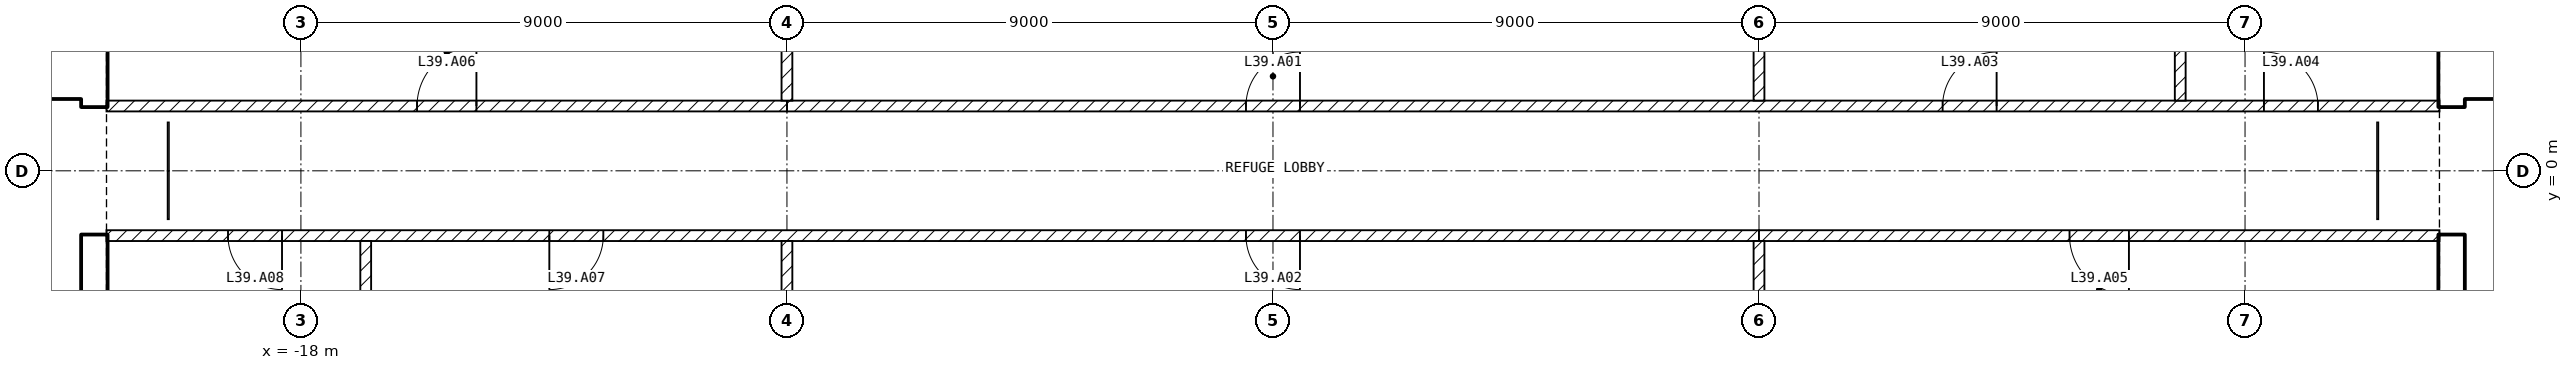
"""IFC4 building model, lengths in metres.
Left out: names, types, materials, properties, quantities, classifications, styles, units other than length and angle.
Written with IfcOpenShell. Run it as: python <this file> out.ifc"""

import sys

from ifc_helpers import new_model, si_unit, direction, frame, frame_2d, origin, place, context, subcontext, project, spatial, rectangle, extrude, element, fill, save


model = new_model("IFC4")
c1 = context("Model", 3, precision=1e-05, world=origin(), true_north=direction((0.0, 1.0)))
c2 = subcontext(c1, "Body", "Model", "MODEL_VIEW")
j1 = project(units=[si_unit("LENGTHUNIT", "METRE"), si_unit("PLANEANGLEUNIT", "RADIAN")], contexts=[c1])
p1 = place(None, origin())
s1 = spatial("IfcSite", under=j1, at=p1, CompositionType="ELEMENT")
p2 = place(p1, origin())
s2 = spatial("IfcBuilding", under=s1, at=p2, CompositionType="ELEMENT")
p3 = place(p2, frame((0.0, 0.0, 162.1)))
s3 = spatial("IfcBuildingStorey", under=s2, at=p3, CompositionType="ELEMENT", Elevation=162.1)
for number, where, z_axis, x_axis in (
    (1, (21.825, -8.1, 0.0), (0.0, 0.0, 1.0), (0.0, 1.0, 0.0)),
    (2, (21.825, 1.2, 0.0), (0.0, 0.0, 1.0), (0.0, 1.0, 0.0)),
):
    element("IfcWall", number, at=place(p3, frame(where, z_axis=z_axis, x_axis=x_axis)), inside=s3, PredefinedType="SHEAR", context=c2, shape_type="SweptSolid", body=[
        extrude(rectangle(XDim=6.9, YDim=0.45, at=frame_2d((3.45, 0.0))), origin(), (0.0, 0.0, 1.0), 4.25),
    ])
p4 = place(p3, frame((22.05, 1.45, 0.0), z_axis=(0.0, 0.0, 1.0), x_axis=(1.0, 0.0, 0.0)))
e3 = element("IfcWall", 3, at=p4, inside=s3, PredefinedType="SOLIDWALL", context=c2, shape_type="SweptSolid", body=[
    extrude(rectangle(XDim=11.15, YDim=0.2, at=frame_2d((5.575, 0.0))), origin(), (0.0, 0.0, 1.0), 4.25),
])
p5 = place(p4, frame((0.75, 0.0, 0.0)))
e4 = element("IfcOpeningElement", 4, at=p5, cuts=e3, PredefinedType="OPENING", context=c2, shape_type="SweptSolid", body=[
    extrude(rectangle(XDim=1.0, YDim=2.1, at=frame_2d((0.5, 1.05))), frame((0.0, 0.11, 0.0), z_axis=(0.0, -1.0, 0.0), x_axis=(1.0, 0.0, 0.0)), (0.0, 0.0, 1.0), 0.22),
])
p6 = place(p4, frame((3.25, 0.0, 0.0)))
e5 = element("IfcOpeningElement", 5, at=p6, cuts=e3, PredefinedType="OPENING", context=c2, shape_type="SweptSolid", body=[
    extrude(rectangle(XDim=1.0, YDim=2.1, at=frame_2d((0.5, 1.05))), frame((0.0, 0.11, 0.0), z_axis=(0.0, -1.0, 0.0), x_axis=(1.0, 0.0, 0.0)), (0.0, 0.0, 1.0), 0.22),
])
p7 = place(p4, frame((9.15, 0.0, 0.0)))
e6 = element("IfcOpeningElement", 6, at=p7, cuts=e3, PredefinedType="OPENING", context=c2, shape_type="SweptSolid", body=[
    extrude(rectangle(XDim=0.9, YDim=2.1, at=frame_2d((0.45, 1.05))), frame((0.0, 0.11, 0.0), z_axis=(0.0, -1.0, 0.0), x_axis=(1.0, 0.0, 0.0)), (0.0, 0.0, 1.0), 0.22),
])
for number, where, z_axis, x_axis in (
    (7, (-21.825, -8.1, 0.0), (0.0, 0.0, 1.0), (0.0, 1.0, 0.0)),
    (8, (-21.825, 1.2, 0.0), (0.0, 0.0, 1.0), (0.0, 1.0, 0.0)),
):
    element("IfcWall", number, at=place(p3, frame(where, z_axis=z_axis, x_axis=x_axis)), inside=s3, PredefinedType="SHEAR", context=c2, shape_type="SweptSolid", body=[
        extrude(rectangle(XDim=6.9, YDim=0.45, at=frame_2d((3.45, 0.0))), origin(), (0.0, 0.0, 1.0), 4.25),
    ])
p8 = place(p3, frame((-33.2, 1.45, 0.0), z_axis=(0.0, 0.0, 1.0), x_axis=(1.0, 0.0, 0.0)))
e9 = element("IfcWall", 9, at=p8, inside=s3, PredefinedType="SOLIDWALL", context=c2, shape_type="SweptSolid", body=[
    extrude(rectangle(XDim=11.15, YDim=0.2, at=frame_2d((5.575, 0.0))), origin(), (0.0, 0.0, 1.0), 4.25),
])
p9 = place(p8, frame((9.4, 0.0, 0.0)))
e10 = element("IfcOpeningElement", 10, at=p9, cuts=e9, PredefinedType="OPENING", context=c2, shape_type="SweptSolid", body=[
    extrude(rectangle(XDim=1.0, YDim=2.1, at=frame_2d((0.5, 1.05))), frame((0.0, 0.11, 0.0), z_axis=(0.0, -1.0, 0.0), x_axis=(1.0, 0.0, 0.0)), (0.0, 0.0, 1.0), 0.22),
])
p10 = place(p8, frame((6.9, 0.0, 0.0)))
e11 = element("IfcOpeningElement", 11, at=p10, cuts=e9, PredefinedType="OPENING", context=c2, shape_type="SweptSolid", body=[
    extrude(rectangle(XDim=1.0, YDim=2.1, at=frame_2d((0.5, 1.05))), frame((0.0, 0.11, 0.0), z_axis=(0.0, -1.0, 0.0), x_axis=(1.0, 0.0, 0.0)), (0.0, 0.0, 1.0), 0.22),
])
p11 = place(p8, frame((1.1, 0.0, 0.0)))
e12 = element("IfcOpeningElement", 12, at=p11, cuts=e9, PredefinedType="OPENING", context=c2, shape_type="SweptSolid", body=[
    extrude(rectangle(XDim=0.9, YDim=2.1, at=frame_2d((0.45, 1.05))), frame((0.0, 0.11, 0.0), z_axis=(0.0, -1.0, 0.0), x_axis=(1.0, 0.0, 0.0)), (0.0, 0.0, 1.0), 0.22),
])
p12 = place(p3, frame((-9.0, 1.2, 0.0), z_axis=(0.0, 0.0, 1.0), x_axis=(1.0, 0.0, 0.0)))
e13 = element("IfcWall", 13, at=p12, inside=s3, PredefinedType="PARTITIONING", context=c2, shape_type="SweptSolid", body=[
    extrude(rectangle(XDim=30.6, YDim=0.2, at=frame_2d((15.3, 0.0))), origin(), (0.0, 0.0, 1.0), 4.25),
])
p13 = place(p12, frame((8.5, 0.0, 0.0)))
e14 = element("IfcOpeningElement", 14, at=p13, cuts=e13, PredefinedType="OPENING", context=c2, shape_type="SweptSolid", body=[
    extrude(rectangle(XDim=1.0, YDim=2.1, at=frame_2d((0.5, 1.05))), frame((0.0, 0.11, 0.0), z_axis=(0.0, -1.0, 0.0), x_axis=(1.0, 0.0, 0.0)), (0.0, 0.0, 1.0), 0.22),
])
p14 = place(p12, frame((21.4, 0.0, 0.0)))
e15 = element("IfcOpeningElement", 15, at=p14, cuts=e13, PredefinedType="OPENING", context=c2, shape_type="SweptSolid", body=[
    extrude(rectangle(XDim=1.0, YDim=2.1, at=frame_2d((0.5, 1.05))), frame((0.0, 0.11, 0.0), z_axis=(0.0, -1.0, 0.0), x_axis=(1.0, 0.0, 0.0)), (0.0, 0.0, 1.0), 0.22),
])
p15 = place(p12, frame((27.35, 0.0, 0.0)))
e16 = element("IfcOpeningElement", 16, at=p15, cuts=e13, PredefinedType="OPENING", context=c2, shape_type="SweptSolid", body=[
    extrude(rectangle(XDim=1.0, YDim=2.1, at=frame_2d((0.5, 1.05))), frame((0.0, 0.11, 0.0), z_axis=(0.0, -1.0, 0.0), x_axis=(1.0, 0.0, 0.0)), (0.0, 0.0, 1.0), 0.22),
])
p16 = place(p3, frame((9.0, -1.2, 0.0), z_axis=(0.0, 0.0, 1.0), x_axis=(-1.0, 0.0, 0.0)))
e17 = element("IfcWall", 17, at=p16, inside=s3, PredefinedType="PARTITIONING", context=c2, shape_type="SweptSolid", body=[
    extrude(rectangle(XDim=30.6, YDim=0.2, at=frame_2d((15.3, 0.0))), origin(), (0.0, 0.0, 1.0), 4.25),
])
p17 = place(p16, frame((8.5, 0.0, 0.0)))
e18 = element("IfcOpeningElement", 18, at=p17, cuts=e17, PredefinedType="OPENING", context=c2, shape_type="SweptSolid", body=[
    extrude(rectangle(XDim=1.0, YDim=2.1, at=frame_2d((0.5, 1.05))), frame((0.0, 0.11, 0.0), z_axis=(0.0, -1.0, 0.0), x_axis=(1.0, 0.0, 0.0)), (0.0, 0.0, 1.0), 0.22),
])
p18 = place(p16, frame((21.4, 0.0, 0.0)))
e19 = element("IfcOpeningElement", 19, at=p18, cuts=e17, PredefinedType="OPENING", context=c2, shape_type="SweptSolid", body=[
    extrude(rectangle(XDim=1.0, YDim=2.1, at=frame_2d((0.5, 1.05))), frame((0.0, 0.11, 0.0), z_axis=(0.0, -1.0, 0.0), x_axis=(1.0, 0.0, 0.0)), (0.0, 0.0, 1.0), 0.22),
])
p19 = place(p16, frame((27.35, 0.0, 0.0)))
e20 = element("IfcOpeningElement", 20, at=p19, cuts=e17, PredefinedType="OPENING", context=c2, shape_type="SweptSolid", body=[
    extrude(rectangle(XDim=1.0, YDim=2.1, at=frame_2d((0.5, 1.05))), frame((0.0, 0.11, 0.0), z_axis=(0.0, -1.0, 0.0), x_axis=(1.0, 0.0, 0.0)), (0.0, 0.0, 1.0), 0.22),
])
p20 = place(p3, frame((21.6, -1.2, 0.0), z_axis=(0.0, 0.0, 1.0), x_axis=(-1.0, 0.0, 0.0)))
e21 = element("IfcWall", 21, at=p20, inside=s3, PredefinedType="PARTITIONING", context=c2, shape_type="SweptSolid", body=[
    extrude(rectangle(XDim=12.6, YDim=0.2, at=frame_2d((6.3, 0.0))), origin(), (0.0, 0.0, 1.0), 4.25),
])
p21 = place(p20, frame((5.75, 0.0, 0.0)))
e22 = element("IfcOpeningElement", 22, at=p21, cuts=e21, PredefinedType="OPENING", context=c2, shape_type="SweptSolid", body=[
    extrude(rectangle(XDim=1.1, YDim=2.1, at=frame_2d((0.55, 1.05))), frame((0.0, 0.11, 0.0), z_axis=(0.0, -1.0, 0.0), x_axis=(1.0, 0.0, 0.0)), (0.0, 0.0, 1.0), 0.22),
])
p22 = place(p3, frame((-21.6, 1.2, 0.0), z_axis=(0.0, 0.0, 1.0), x_axis=(1.0, 0.0, 0.0)))
e23 = element("IfcWall", 23, at=p22, inside=s3, PredefinedType="PARTITIONING", context=c2, shape_type="SweptSolid", body=[
    extrude(rectangle(XDim=12.6, YDim=0.2, at=frame_2d((6.3, 0.0))), origin(), (0.0, 0.0, 1.0), 4.25),
])
p23 = place(p22, frame((5.75, 0.0, 0.0)))
e24 = element("IfcOpeningElement", 24, at=p23, cuts=e23, PredefinedType="OPENING", context=c2, shape_type="SweptSolid", body=[
    extrude(rectangle(XDim=1.1, YDim=2.1, at=frame_2d((0.55, 1.05))), frame((0.0, 0.11, 0.0), z_axis=(0.0, -1.0, 0.0), x_axis=(1.0, 0.0, 0.0)), (0.0, 0.0, 1.0), 0.22),
])
for number, where, z_axis, x_axis in (
    (25, (9.0, 8.9, 0.0), (0.0, 0.0, 1.0), (0.0, -1.0, 0.0)),
    (26, (-9.0, 1.3, 0.0), (0.0, 0.0, 1.0), (0.0, 1.0, 0.0)),
    (27, (9.0, -1.3, 0.0), (0.0, 0.0, 1.0), (0.0, -1.0, 0.0)),
    (28, (-9.0, -8.9, 0.0), (0.0, 0.0, 1.0), (0.0, 1.0, 0.0)),
    (29, (16.8, 8.9, 0.0), (0.0, 0.0, 1.0), (0.0, -1.0, 0.0)),
    (30, (-16.8, -8.9, 0.0), (0.0, 0.0, 1.0), (0.0, 1.0, 0.0)),
):
    element("IfcWall", number, at=place(p3, frame(where, z_axis=z_axis, x_axis=x_axis)), inside=s3, PredefinedType="PARTITIONING", context=c2, shape_type="SweptSolid", body=[
        extrude(rectangle(XDim=7.6, YDim=0.2, at=frame_2d((3.8, 0.0))), origin(), (0.0, 0.0, 1.0), 4.25),
    ])
p24 = place(p13, origin())
e31 = element("IfcDoor", 31, at=p24, inside=s3, OperationType="SINGLE_SWING_RIGHT", PredefinedType="DOOR", context=c2, shape_type="SweptSolid", body=[
    extrude(rectangle(XDim=1.0, YDim=2.1, at=frame_2d((0.5, 1.05))), frame((0.0, 0.025, 0.0), z_axis=(0.0, -1.0, 0.0), x_axis=(1.0, 0.0, 0.0)), (0.0, 0.0, 1.0), 0.05),
])
fill(e14, e31)
p25 = place(p17, origin())
e32 = element("IfcDoor", 32, at=p25, inside=s3, OperationType="SINGLE_SWING_LEFT", PredefinedType="DOOR", context=c2, shape_type="SweptSolid", body=[
    extrude(rectangle(XDim=1.0, YDim=2.1, at=frame_2d((0.5, 1.05))), frame((0.0, 0.025, 0.0), z_axis=(0.0, -1.0, 0.0), x_axis=(1.0, 0.0, 0.0)), (0.0, 0.0, 1.0), 0.05),
])
fill(e18, e32)
p26 = place(p14, origin())
e33 = element("IfcDoor", 33, at=p26, inside=s3, OperationType="SINGLE_SWING_RIGHT", PredefinedType="DOOR", context=c2, shape_type="SweptSolid", body=[
    extrude(rectangle(XDim=1.0, YDim=2.1, at=frame_2d((0.5, 1.05))), frame((0.0, 0.025, 0.0), z_axis=(0.0, -1.0, 0.0), x_axis=(1.0, 0.0, 0.0)), (0.0, 0.0, 1.0), 0.05),
])
fill(e15, e33)
p27 = place(p15, origin())
e34 = element("IfcDoor", 34, at=p27, inside=s3, OperationType="SINGLE_SWING_LEFT", PredefinedType="DOOR", context=c2, shape_type="SweptSolid", body=[
    extrude(rectangle(XDim=1.0, YDim=2.1, at=frame_2d((0.5, 1.05))), frame((0.0, 0.025, 0.0), z_axis=(0.0, -1.0, 0.0), x_axis=(1.0, 0.0, 0.0)), (0.0, 0.0, 1.0), 0.05),
])
fill(e16, e34)
p28 = place(p21, origin())
e35 = element("IfcDoor", 35, at=p28, inside=s3, OperationType="SINGLE_SWING_LEFT", PredefinedType="DOOR", context=c2, shape_type="SweptSolid", body=[
    extrude(rectangle(XDim=1.1, YDim=2.1, at=frame_2d((0.55, 1.05))), frame((0.0, 0.025, 0.0), z_axis=(0.0, -1.0, 0.0), x_axis=(1.0, 0.0, 0.0)), (0.0, 0.0, 1.0), 0.05),
])
fill(e22, e35)
p29 = place(p23, origin())
e36 = element("IfcDoor", 36, at=p29, inside=s3, OperationType="SINGLE_SWING_RIGHT", PredefinedType="DOOR", context=c2, shape_type="SweptSolid", body=[
    extrude(rectangle(XDim=1.1, YDim=2.1, at=frame_2d((0.55, 1.05))), frame((0.0, 0.025, 0.0), z_axis=(0.0, -1.0, 0.0), x_axis=(1.0, 0.0, 0.0)), (0.0, 0.0, 1.0), 0.05),
])
fill(e24, e36)
p30 = place(p18, origin())
e37 = element("IfcDoor", 37, at=p30, inside=s3, OperationType="SINGLE_SWING_RIGHT", PredefinedType="DOOR", context=c2, shape_type="SweptSolid", body=[
    extrude(rectangle(XDim=1.0, YDim=2.1, at=frame_2d((0.5, 1.05))), frame((0.0, 0.025, 0.0), z_axis=(0.0, -1.0, 0.0), x_axis=(1.0, 0.0, 0.0)), (0.0, 0.0, 1.0), 0.05),
])
fill(e19, e37)
p31 = place(p19, origin())
e38 = element("IfcDoor", 38, at=p31, inside=s3, OperationType="SINGLE_SWING_LEFT", PredefinedType="DOOR", context=c2, shape_type="SweptSolid", body=[
    extrude(rectangle(XDim=1.0, YDim=2.1, at=frame_2d((0.5, 1.05))), frame((0.0, 0.025, 0.0), z_axis=(0.0, -1.0, 0.0), x_axis=(1.0, 0.0, 0.0)), (0.0, 0.0, 1.0), 0.05),
])
fill(e20, e38)
save(model, sys.argv[1])
